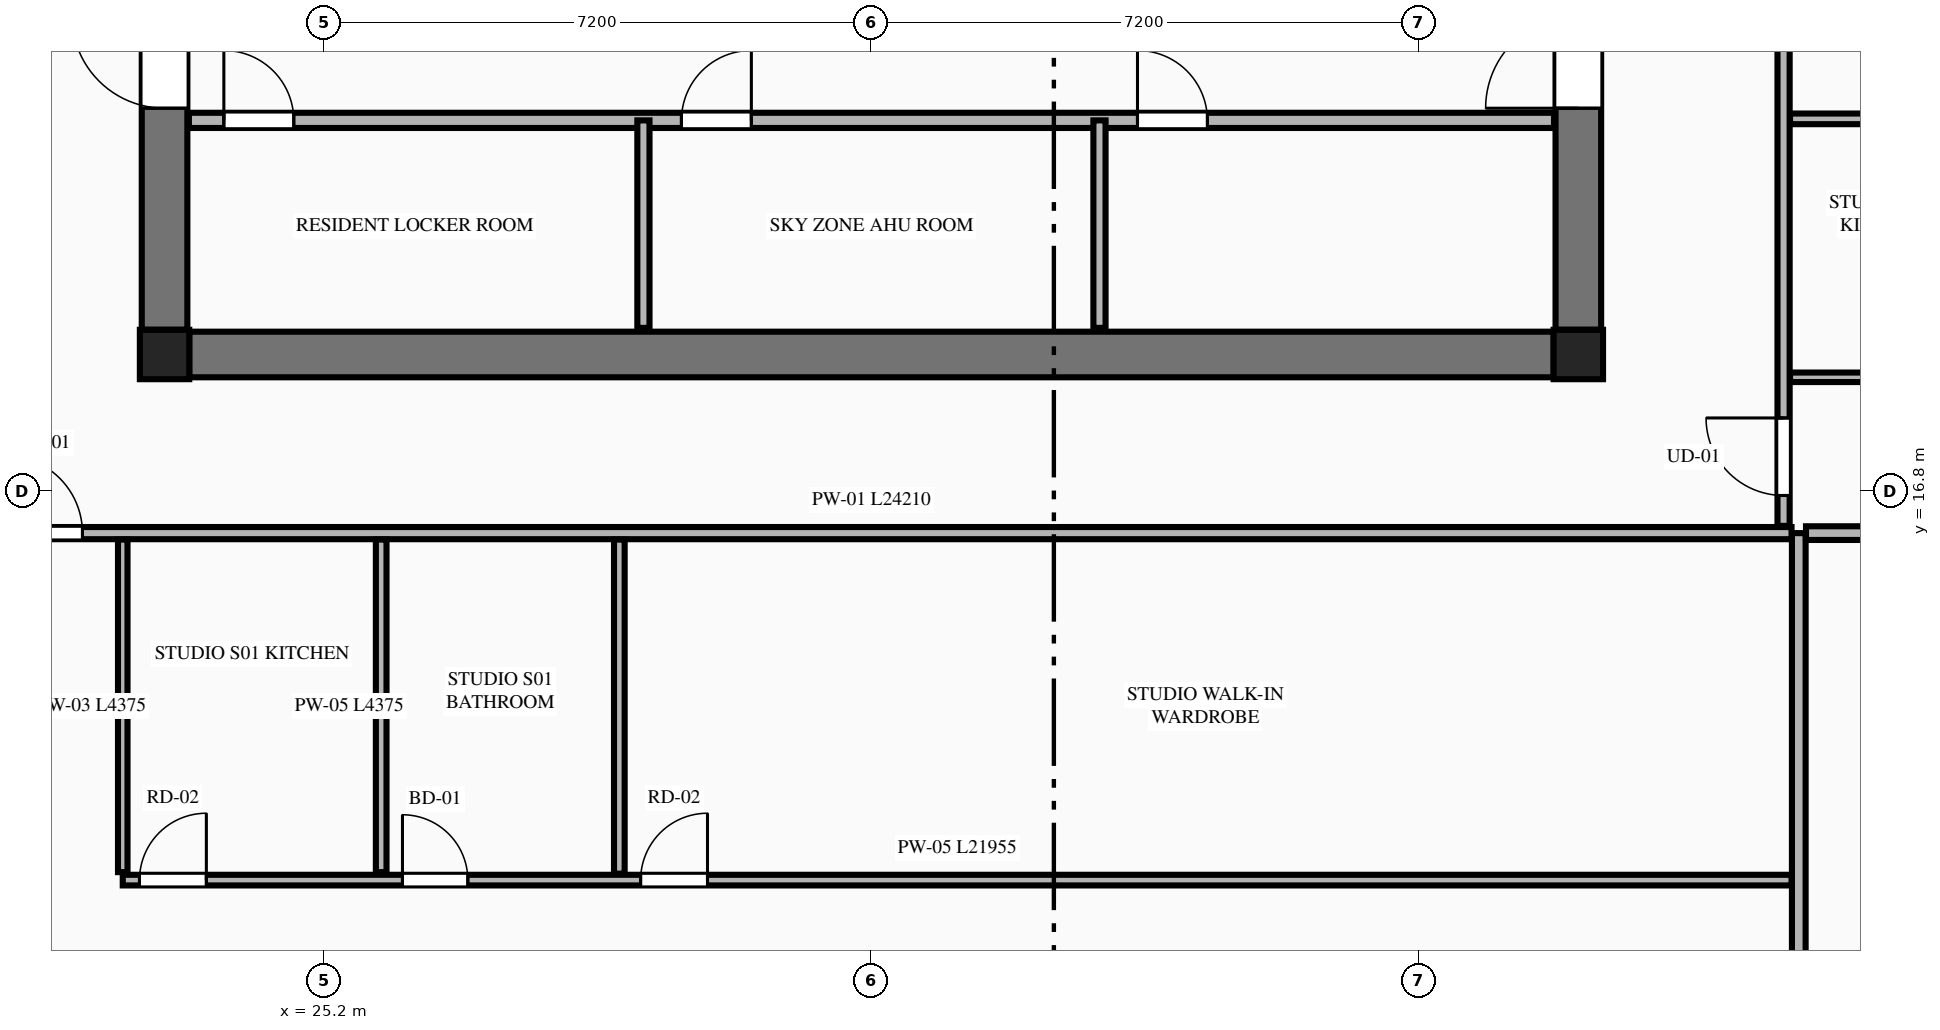
"""IFC4 building model, lengths in metres.
Left out: names, types, materials, properties, quantities, classifications, styles, units other than length and angle.
Written with IfcOpenShell. Run it as: python <this file> out.ifc"""

import sys

from ifc_helpers import new_model, si_unit, direction, frame, frame_2d, origin, origin_2d, place, context, subcontext, project, spatial, rectangle, extrude, element, fill, save


model = new_model("IFC4")
c1 = context("Model", 3, precision=1e-05, world=origin(), true_north=direction((0.0, 1.0)))
c2 = subcontext(c1, "Body", "Model", "MODEL_VIEW")
j1 = project(units=[si_unit("LENGTHUNIT", "METRE"), si_unit("PLANEANGLEUNIT", "RADIAN")], contexts=[c1])
p1 = place(None, origin())
s1 = spatial("IfcSite", under=j1, at=p1, CompositionType="ELEMENT")
p2 = place(p1, origin())
s2 = spatial("IfcBuilding", under=s1, at=p2, CompositionType="ELEMENT")
p3 = place(p2, frame((0.0, 0.0, 218.05)))
s3 = spatial("IfcBuildingStorey", under=s2, at=p3, CompositionType="ELEMENT", Elevation=218.05)
for number, where, z_axis, x_axis in (
    (1, (23.1, 18.6, 0.0), (0.0, 0.0, 1.0), (1.0, 0.0, 0.0)),
    (2, (41.7, 18.6, 0.0), (0.0, 0.0, 1.0), (1.0, 0.0, 0.0)),
):
    element("IfcColumn", number, at=place(p3, frame(where, z_axis=z_axis, x_axis=x_axis)), inside=s3, PredefinedType="COLUMN", context=c2, shape_type="SweptSolid", body=[
        extrude(rectangle(XDim=0.65, YDim=0.65, at=origin_2d()), origin(), (0.0, 0.0, 1.0), 3.55),
    ])
p4 = place(p3, frame((23.425, 18.6, 0.0), z_axis=(0.0, 0.0, 1.0), x_axis=(1.0, 0.0, 0.0)))
e3 = element("IfcWall", 3, at=p4, inside=s3, PredefinedType="SHEAR", context=c2, shape_type="SweptSolid", body=[
    extrude(rectangle(XDim=17.95, YDim=0.6, at=frame_2d((8.975, 0.0))), origin(), (0.0, 0.0, 1.0), 3.27),
])
p5 = place(p3, frame((23.1, 18.925, 0.0), z_axis=(0.0, 0.0, 1.0), x_axis=(0.0, 1.0, 0.0)))
e4 = element("IfcWall", 4, at=p5, inside=s3, PredefinedType="SHEAR", context=c2, shape_type="SweptSolid", body=[
    extrude(rectangle(XDim=13.95, YDim=0.6, at=frame_2d((6.975, 0.0))), origin(), (0.0, 0.0, 1.0), 3.27),
])
p6 = place(p5, frame((2.915, 0.0, 0.0)))
e5 = element("IfcOpeningElement", 5, at=p6, cuts=e4, PredefinedType="OPENING", context=c2, shape_type="SweptSolid", body=[
    extrude(rectangle(XDim=1.22, YDim=2.25, at=frame_2d((0.61, 1.125))), frame((0.0, 0.31, 0.0), z_axis=(0.0, -1.0, 0.0), x_axis=(1.0, 0.0, 0.0)), (0.0, 0.0, 1.0), 0.62),
])
p7 = place(p3, frame((41.7, 18.925, 0.0), z_axis=(0.0, 0.0, 1.0), x_axis=(0.0, 1.0, 0.0)))
e6 = element("IfcWall", 6, at=p7, inside=s3, PredefinedType="SHEAR", context=c2, shape_type="SweptSolid", body=[
    extrude(rectangle(XDim=13.95, YDim=0.6, at=frame_2d((6.975, 0.0))), origin(), (0.0, 0.0, 1.0), 3.27),
])
p8 = place(p7, frame((2.915, 0.0, 0.0)))
e7 = element("IfcOpeningElement", 7, at=p8, cuts=e6, PredefinedType="OPENING", context=c2, shape_type="SweptSolid", body=[
    extrude(rectangle(XDim=1.22, YDim=2.25, at=frame_2d((0.61, 1.125))), frame((0.0, 0.31, 0.0), z_axis=(0.0, -1.0, 0.0), x_axis=(1.0, 0.0, 0.0)), (0.0, 0.0, 1.0), 0.62),
])
p9 = place(p3, frame((23.42, 21.68, 0.0), z_axis=(0.0, 0.0, 1.0), x_axis=(1.0, 0.0, 0.0)))
e8 = element("IfcWall", 8, at=p9, inside=s3, PredefinedType="PLUMBINGWALL", context=c2, shape_type="SweptSolid", body=[
    extrude(rectangle(XDim=17.96, YDim=0.2, at=frame_2d((8.98, 0.0))), origin(), (0.0, 0.0, 1.0), 3.27),
])
p10 = place(p9, frame((0.46, 0.0, 0.0)))
e9 = element("IfcOpeningElement", 9, at=p10, cuts=e8, PredefinedType="OPENING", context=c2, shape_type="SweptSolid", body=[
    extrude(rectangle(XDim=0.92, YDim=2.15, at=frame_2d((0.46, 1.075))), frame((0.0, 0.11, 0.0), z_axis=(0.0, -1.0, 0.0), x_axis=(1.0, 0.0, 0.0)), (0.0, 0.0, 1.0), 0.22),
])
p11 = place(p9, frame((6.48, 0.0, 0.0)))
e10 = element("IfcOpeningElement", 10, at=p11, cuts=e8, PredefinedType="OPENING", context=c2, shape_type="SweptSolid", body=[
    extrude(rectangle(XDim=0.92, YDim=2.15, at=frame_2d((0.46, 1.075))), frame((0.0, 0.11, 0.0), z_axis=(0.0, -1.0, 0.0), x_axis=(1.0, 0.0, 0.0)), (0.0, 0.0, 1.0), 0.22),
])
p12 = place(p9, frame((12.48, 0.0, 0.0)))
e11 = element("IfcOpeningElement", 11, at=p12, cuts=e8, PredefinedType="OPENING", context=c2, shape_type="SweptSolid", body=[
    extrude(rectangle(XDim=0.92, YDim=2.15, at=frame_2d((0.46, 1.075))), frame((0.0, 0.11, 0.0), z_axis=(0.0, -1.0, 0.0), x_axis=(1.0, 0.0, 0.0)), (0.0, 0.0, 1.0), 0.22),
])
for number, where, z_axis, x_axis in (
    (12, (29.4, 18.95, 0.0), (0.0, 0.0, 1.0), (0.0, 1.0, 0.0)),
    (13, (35.4, 18.95, 0.0), (0.0, 0.0, 1.0), (0.0, 1.0, 0.0)),
):
    element("IfcWall", number, at=place(p3, frame(where, z_axis=z_axis, x_axis=x_axis)), inside=s3, PredefinedType="PARTITIONING", context=c2, shape_type="SweptSolid", body=[
        extrude(rectangle(XDim=2.73, YDim=0.16, at=frame_2d((1.365, 0.0))), origin(), (0.0, 0.0, 1.0), 3.27),
    ])
p13 = place(p3, frame((44.6, 5.968, 0.0), z_axis=(0.0, 0.0, 1.0), x_axis=(0.0, 1.0, 0.0)))
e14 = element("IfcWall", 14, at=p13, inside=s3, PredefinedType="PARTITIONING", context=c2, shape_type="SweptSolid", body=[
    extrude(rectangle(XDim=10.282, YDim=0.18, at=frame_2d((5.141, 0.0))), origin(), (0.0, 0.0, 1.0), 3.27),
])
p14 = place(p3, frame((20.295, 16.25, 0.0), z_axis=(0.0, 0.0, 1.0), x_axis=(1.0, 0.0, 0.0)))
e15 = element("IfcWall", 15, at=p14, inside=s3, PredefinedType="PARTITIONING", context=c2, shape_type="SweptSolid", body=[
    extrude(rectangle(XDim=24.21, YDim=0.16, at=frame_2d((12.105, 0.0))), origin(), (0.0, 0.0, 1.0), 3.27),
])
p15 = place(p14, frame((0.705, 0.0, 0.0)))
e16 = element("IfcOpeningElement", 16, at=p15, cuts=e15, PredefinedType="OPENING", context=c2, shape_type="SweptSolid", body=[
    extrude(rectangle(XDim=1.02, YDim=2.25, at=frame_2d((0.51, 1.125))), frame((0.0, 0.09, 0.0), z_axis=(0.0, -1.0, 0.0), x_axis=(1.0, 0.0, 0.0)), (0.0, 0.0, 1.0), 0.18),
])
p16 = place(p3, frame((22.55, 11.79, 0.0), z_axis=(0.0, 0.0, 1.0), x_axis=(0.0, 1.0, 0.0)))
e17 = element("IfcWall", 17, at=p16, inside=s3, PredefinedType="PARTITIONING", context=c2, shape_type="SweptSolid", body=[
    extrude(rectangle(XDim=4.375, YDim=0.125, at=frame_2d((2.188, 0.0))), origin(), (0.0, 0.0, 1.0), 2.727),
])
p17 = place(p3, frame((22.55, 11.685, 0.0), z_axis=(0.0, 0.0, 1.0), x_axis=(1.0, 0.0, 0.0)))
e18 = element("IfcWall", 18, at=p17, inside=s3, PredefinedType="PLUMBINGWALL", context=c2, shape_type="SweptSolid", body=[
    extrude(rectangle(XDim=21.955, YDim=0.14, at=frame_2d((10.978, 0.0))), origin(), (0.0, 0.0, 1.0), 3.27),
])
p18 = place(p17, frame((3.68, 0.0, 0.0)))
e19 = element("IfcOpeningElement", 19, at=p18, cuts=e18, PredefinedType="OPENING", context=c2, shape_type="SweptSolid", body=[
    extrude(rectangle(XDim=0.86, YDim=2.1, at=frame_2d((0.43, 1.05))), frame((0.0, 0.08, 0.0), z_axis=(0.0, -1.0, 0.0), x_axis=(1.0, 0.0, 0.0)), (0.0, 0.0, 1.0), 0.16),
])
p19 = place(p17, frame((6.813, 0.0, 0.0)))
e20 = element("IfcOpeningElement", 20, at=p19, cuts=e18, PredefinedType="OPENING", context=c2, shape_type="SweptSolid", body=[
    extrude(rectangle(XDim=0.88, YDim=2.15, at=frame_2d((0.44, 1.075))), frame((0.0, 0.08, 0.0), z_axis=(0.0, -1.0, 0.0), x_axis=(1.0, 0.0, 0.0)), (0.0, 0.0, 1.0), 0.16),
])
p20 = place(p17, frame((0.22, 0.0, 0.0)))
e21 = element("IfcOpeningElement", 21, at=p20, cuts=e18, PredefinedType="OPENING", context=c2, shape_type="SweptSolid", body=[
    extrude(rectangle(XDim=0.88, YDim=2.15, at=frame_2d((0.44, 1.075))), frame((0.0, 0.08, 0.0), z_axis=(0.0, -1.0, 0.0), x_axis=(1.0, 0.0, 0.0)), (0.0, 0.0, 1.0), 0.16),
])
p21 = place(p3, frame((25.95, 11.79, 0.0), z_axis=(0.0, 0.0, 1.0), x_axis=(0.0, 1.0, 0.0)))
e22 = element("IfcWall", 22, at=p21, inside=s3, PredefinedType="PLUMBINGWALL", context=c2, shape_type="SweptSolid", body=[
    extrude(rectangle(XDim=4.375, YDim=0.14, at=frame_2d((2.188, 0.0))), origin(), (0.0, 0.0, 1.0), 3.27),
])
p22 = place(p3, frame((29.083, 11.77, 0.0), z_axis=(0.0, 0.0, 1.0), x_axis=(0.0, 1.0, 0.0)))
e23 = element("IfcWall", 23, at=p22, inside=s3, PredefinedType="PLUMBINGWALL", context=c2, shape_type="SweptSolid", body=[
    extrude(rectangle(XDim=4.395, YDim=0.14, at=frame_2d((2.198, 0.0))), origin(), (0.0, 0.0, 1.0), 3.27),
])
p23 = place(p3, frame((44.695, 16.25, 0.0), z_axis=(0.0, 0.0, 1.0), x_axis=(1.0, 0.0, 0.0)))
e24 = element("IfcWall", 24, at=p23, inside=s3, PredefinedType="PARTITIONING", context=c2, shape_type="SweptSolid", body=[
    extrude(rectangle(XDim=5.894, YDim=0.18, at=frame_2d((2.947, 0.0))), origin(), (0.0, 0.0, 1.0), 3.27),
])
p24 = place(p3, frame((44.4, 16.345, 0.0), z_axis=(0.0, 0.0, 1.0), x_axis=(0.0, 1.0, 0.0)))
e25 = element("IfcWall", 25, at=p24, inside=s3, PredefinedType="PARTITIONING", context=c2, shape_type="SweptSolid", body=[
    extrude(rectangle(XDim=9.638, YDim=0.16, at=frame_2d((4.819, 0.0))), origin(), (0.0, 0.0, 1.0), 3.27),
])
p25 = place(p24, frame((0.4, 0.0, 0.0)))
e26 = element("IfcOpeningElement", 26, at=p25, cuts=e25, PredefinedType="OPENING", context=c2, shape_type="SweptSolid", body=[
    extrude(rectangle(XDim=1.02, YDim=2.25, at=frame_2d((0.51, 1.125))), frame((0.0, 0.09, 0.0), z_axis=(0.0, -1.0, 0.0), x_axis=(1.0, 0.0, 0.0)), (0.0, 0.0, 1.0), 0.18),
])
p26 = place(p3, frame((44.485, 18.3, 0.0), z_axis=(0.0, 0.0, 1.0), x_axis=(1.0, 0.0, 0.0)))
e27 = element("IfcWall", 27, at=p26, inside=s3, PredefinedType="PARTITIONING", context=c2, shape_type="SweptSolid", body=[
    extrude(rectangle(XDim=2.58, YDim=0.125, at=frame_2d((1.29, 0.0))), origin(), (0.0, 0.0, 1.0), 2.727),
])
p27 = place(p3, frame((44.485, 21.7, 0.0), z_axis=(0.0, 0.0, 1.0), x_axis=(1.0, 0.0, 0.0)))
e28 = element("IfcWall", 28, at=p27, inside=s3, PredefinedType="PLUMBINGWALL", context=c2, shape_type="SweptSolid", body=[
    extrude(rectangle(XDim=2.58, YDim=0.14, at=frame_2d((1.29, 0.0))), origin(), (0.0, 0.0, 1.0), 3.27),
])
p28 = place(p6, origin())
e29 = element("IfcDoor", 29, at=p28, inside=s3, OperationType="SINGLE_SWING_RIGHT", PredefinedType="DOOR", context=c2, shape_type="SweptSolid", body=[
    extrude(rectangle(XDim=1.22, YDim=2.25, at=frame_2d((0.61, 1.125))), frame((0.0, 0.025, 0.0), z_axis=(0.0, -1.0, 0.0), x_axis=(1.0, 0.0, 0.0)), (0.0, 0.0, 1.0), 0.05),
])
fill(e5, e29)
p29 = place(p8, origin())
e30 = element("IfcDoor", 30, at=p29, inside=s3, OperationType="SINGLE_SWING_LEFT", PredefinedType="DOOR", context=c2, shape_type="SweptSolid", body=[
    extrude(rectangle(XDim=1.22, YDim=2.25, at=frame_2d((0.61, 1.125))), frame((0.0, 0.025, 0.0), z_axis=(0.0, -1.0, 0.0), x_axis=(1.0, 0.0, 0.0)), (0.0, 0.0, 1.0), 0.05),
])
fill(e7, e30)
p30 = place(p10, origin())
e31 = element("IfcDoor", 31, at=p30, inside=s3, OperationType="SINGLE_SWING_LEFT", PredefinedType="DOOR", context=c2, shape_type="SweptSolid", body=[
    extrude(rectangle(XDim=0.92, YDim=2.15, at=frame_2d((0.46, 1.075))), frame((0.0, 0.025, 0.0), z_axis=(0.0, -1.0, 0.0), x_axis=(1.0, 0.0, 0.0)), (0.0, 0.0, 1.0), 0.05),
])
fill(e9, e31)
p31 = place(p11, origin())
e32 = element("IfcDoor", 32, at=p31, inside=s3, OperationType="SINGLE_SWING_RIGHT", PredefinedType="DOOR", context=c2, shape_type="SweptSolid", body=[
    extrude(rectangle(XDim=0.92, YDim=2.15, at=frame_2d((0.46, 1.075))), frame((0.0, 0.025, 0.0), z_axis=(0.0, -1.0, 0.0), x_axis=(1.0, 0.0, 0.0)), (0.0, 0.0, 1.0), 0.05),
])
fill(e10, e32)
p32 = place(p12, origin())
e33 = element("IfcDoor", 33, at=p32, inside=s3, OperationType="SINGLE_SWING_LEFT", PredefinedType="DOOR", context=c2, shape_type="SweptSolid", body=[
    extrude(rectangle(XDim=0.92, YDim=2.15, at=frame_2d((0.46, 1.075))), frame((0.0, 0.025, 0.0), z_axis=(0.0, -1.0, 0.0), x_axis=(1.0, 0.0, 0.0)), (0.0, 0.0, 1.0), 0.05),
])
fill(e11, e33)
p33 = place(p18, origin())
e34 = element("IfcDoor", 34, at=p33, inside=s3, OperationType="SINGLE_SWING_LEFT", PredefinedType="DOOR", context=c2, shape_type="SweptSolid", body=[
    extrude(rectangle(XDim=0.86, YDim=2.1, at=frame_2d((0.43, 1.05))), frame((0.0, 0.025, 0.0), z_axis=(0.0, -1.0, 0.0), x_axis=(1.0, 0.0, 0.0)), (0.0, 0.0, 1.0), 0.05),
])
fill(e19, e34)
p34 = place(p19, origin())
e35 = element("IfcDoor", 35, at=p34, inside=s3, OperationType="SINGLE_SWING_RIGHT", PredefinedType="DOOR", context=c2, shape_type="SweptSolid", body=[
    extrude(rectangle(XDim=0.88, YDim=2.15, at=frame_2d((0.44, 1.075))), frame((0.0, 0.025, 0.0), z_axis=(0.0, -1.0, 0.0), x_axis=(1.0, 0.0, 0.0)), (0.0, 0.0, 1.0), 0.05),
])
fill(e20, e35)
p35 = place(p15, origin())
e36 = element("IfcDoor", 36, at=p35, inside=s3, OperationType="SINGLE_SWING_LEFT", PredefinedType="DOOR", context=c2, shape_type="SweptSolid", body=[
    extrude(rectangle(XDim=1.02, YDim=2.25, at=frame_2d((0.51, 1.125))), frame((0.0, 0.025, 0.0), z_axis=(0.0, -1.0, 0.0), x_axis=(1.0, 0.0, 0.0)), (0.0, 0.0, 1.0), 0.05),
])
fill(e16, e36)
p36 = place(p20, origin())
e37 = element("IfcDoor", 37, at=p36, inside=s3, OperationType="SINGLE_SWING_RIGHT", PredefinedType="DOOR", context=c2, shape_type="SweptSolid", body=[
    extrude(rectangle(XDim=0.88, YDim=2.15, at=frame_2d((0.44, 1.075))), frame((0.0, 0.025, 0.0), z_axis=(0.0, -1.0, 0.0), x_axis=(1.0, 0.0, 0.0)), (0.0, 0.0, 1.0), 0.05),
])
fill(e21, e37)
p37 = place(p25, origin())
e38 = element("IfcDoor", 38, at=p37, inside=s3, OperationType="SINGLE_SWING_RIGHT", PredefinedType="DOOR", context=c2, shape_type="SweptSolid", body=[
    extrude(rectangle(XDim=1.02, YDim=2.25, at=frame_2d((0.51, 1.125))), frame((0.0, 0.025, 0.0), z_axis=(0.0, -1.0, 0.0), x_axis=(1.0, 0.0, 0.0)), (0.0, 0.0, 1.0), 0.05),
])
fill(e26, e38)
save(model, sys.argv[1])
